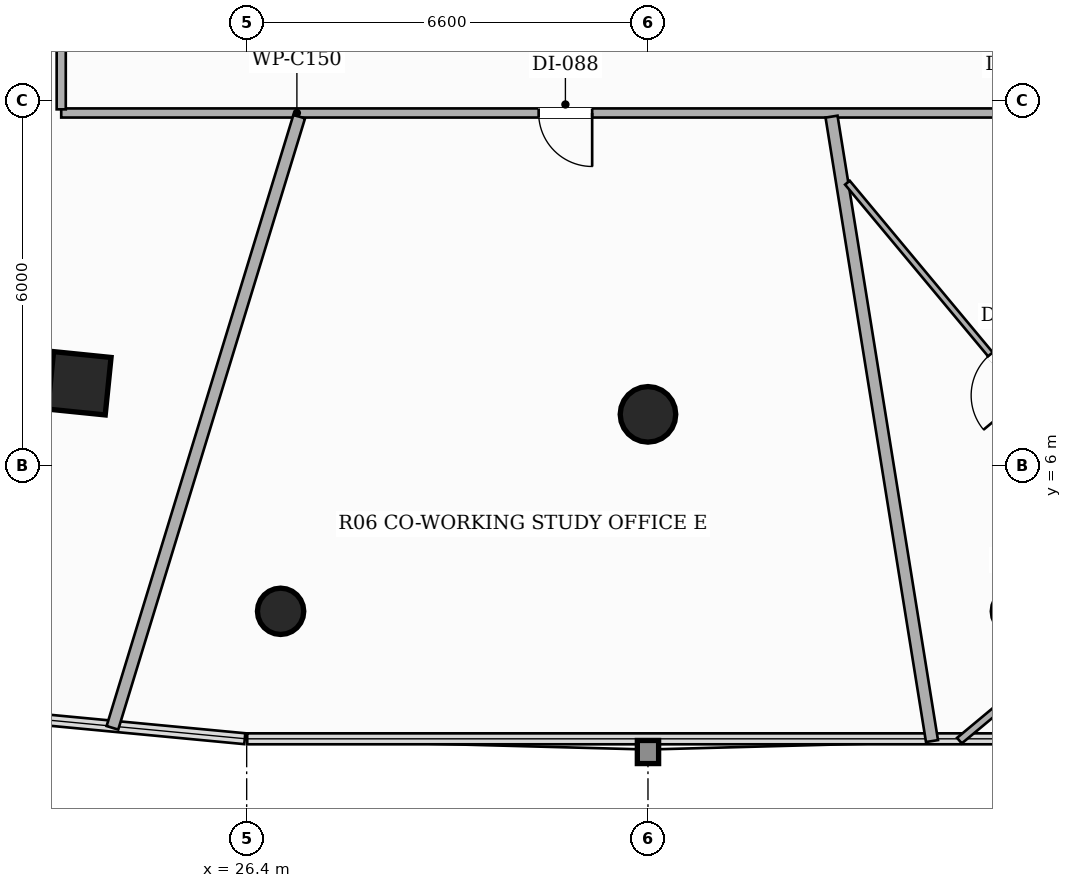
"""IFC4 building model, lengths in metres.
Left out: names, types, materials, properties, quantities, classifications, styles, units other than length and angle.
Written with IfcOpenShell. Run it as: python <this file> out.ifc"""

import sys

from ifc_helpers import new_model, si_unit, direction, frame, frame_2d, origin, origin_2d, place, context, subcontext, project, spatial, rectangle, hollow_rectangle, hollow_circle, extrude, element, fill, save


model = new_model("IFC4")
c1 = context("Model", 3, precision=1e-05, world=origin(), true_north=direction((0.0, 1.0)))
c2 = subcontext(c1, "Body", "Model", "MODEL_VIEW")
j1 = project(units=[si_unit("LENGTHUNIT", "METRE"), si_unit("PLANEANGLEUNIT", "RADIAN")], contexts=[c1])
p1 = place(None, origin())
s1 = spatial("IfcSite", under=j1, at=p1, CompositionType="ELEMENT")
p2 = place(p1, origin())
s2 = spatial("IfcBuilding", under=s1, at=p2, CompositionType="ELEMENT")
p3 = place(p2, frame((0.0, 0.0, 46.7)))
s3 = spatial("IfcBuildingStorey", under=s2, at=p3, CompositionType="ELEMENT", Elevation=46.7)
p4 = place(p3, frame((23.649, 7.355, 0.0), z_axis=(0.0, 0.0, 1.0), x_axis=(-0.994880708829, 0.101056297183, 0.0)))
e1 = element("IfcColumn", 1, at=p4, inside=s3, PredefinedType="COLUMN", context=c2, shape_type="SweptSolid", body=[
    extrude(hollow_rectangle(XDim=0.95, YDim=0.95, WallThickness=0.032, at=origin_2d()), origin(), (0.0, 0.0, 1.0), 3.3),
])
p5 = place(p3, frame((33.0, 6.844, 0.0), z_axis=(0.0, 0.0, 1.0), x_axis=(1.0, 0.0, 0.0)))
e2 = element("IfcColumn", 2, at=p5, inside=s3, PredefinedType="COLUMN", context=c2, shape_type="SweptSolid", body=[
    extrude(hollow_circle(Radius=0.457, WallThickness=0.025, at=origin_2d()), origin(), (0.0, 0.0, 1.0), 3.3),
])
for number, where, z_axis, x_axis in (
    (3, (26.958, 3.605, 0.0), (0.0, 0.0, 1.0), (1.0, 0.0, 0.0)),
    (4, (39.042, 3.605, 0.0), (0.0, 0.0, 1.0), (1.0, 0.0, 0.0)),
):
    element("IfcColumn", number, at=place(p3, frame(where, z_axis=z_axis, x_axis=x_axis)), inside=s3, PredefinedType="COLUMN", context=c2, shape_type="SweptSolid", body=[
        extrude(hollow_circle(Radius=0.381, WallThickness=0.022, at=origin_2d()), origin(), (0.0, 0.0, 1.0), 3.3),
    ])
p6 = place(p3, frame((42.59, 11.8, 0.0), z_axis=(0.0, 0.0, 1.0), x_axis=(-1.0, 0.0, 0.0)))
e5 = element("IfcWall", 5, at=p6, inside=s3, PredefinedType="PARTITIONING", context=c2, shape_type="SweptSolid", body=[
    extrude(rectangle(XDim=19.24, YDim=0.15, at=frame_2d((9.62, 0.0))), origin(), (0.0, 0.0, 1.0), 2.669),
])
p7 = place(p6, frame((10.508, 0.0, 0.0)))
e6 = element("IfcOpeningElement", 6, at=p7, cuts=e5, PredefinedType="OPENING", context=c2, shape_type="SweptSolid", body=[
    extrude(rectangle(XDim=0.88, YDim=2.1, at=frame_2d((0.44, 1.05))), frame((0.0, 0.085, 0.0), z_axis=(0.0, -1.0, 0.0), x_axis=(1.0, 0.0, 0.0)), (0.0, 0.0, 1.0), 0.17),
])
p8 = place(p6, frame((2.98, 0.0, 0.0)))
e7 = element("IfcOpeningElement", 7, at=p8, cuts=e5, PredefinedType="OPENING", context=c2, shape_type="SweptSolid", body=[
    extrude(rectangle(XDim=0.92, YDim=2.15, at=frame_2d((0.46, 1.075))), frame((0.0, 0.085, 0.0), z_axis=(0.0, -1.0, 0.0), x_axis=(1.0, 0.0, 0.0)), (0.0, 0.0, 1.0), 0.17),
])
p9 = place(p3, frame((23.35, 11.86, 0.0), z_axis=(0.0, 0.0, 1.0), x_axis=(0.0, 1.0, 0.0)))
e8 = element("IfcWall", 8, at=p9, inside=s3, PredefinedType="PARTITIONING", context=c2, shape_type="SweptSolid", body=[
    extrude(rectangle(XDim=25.04, YDim=0.15, at=frame_2d((12.52, 0.0))), origin(), (0.0, 0.0, 1.0), 2.413),
])
p10 = place(p9, frame((18.67, 0.0, 0.0)))
e9 = element("IfcOpeningElement", 9, at=p10, cuts=e8, PredefinedType="OPENING", context=c2, shape_type="SweptSolid", body=[
    extrude(rectangle(XDim=0.88, YDim=2.1, at=frame_2d((0.44, 1.05))), frame((0.0, 0.085, 0.0), z_axis=(0.0, -1.0, 0.0), x_axis=(1.0, 0.0, 0.0)), (0.0, 0.0, 1.0), 0.17),
])
p11 = place(p9, frame((3.543, 0.0, 0.0)))
e10 = element("IfcOpeningElement", 10, at=p11, cuts=e8, PredefinedType="OPENING", context=c2, shape_type="SweptSolid", body=[
    extrude(rectangle(XDim=0.88, YDim=2.1, at=frame_2d((0.44, 1.05))), frame((0.0, 0.085, 0.0), z_axis=(0.0, -1.0, 0.0), x_axis=(1.0, 0.0, 0.0)), (0.0, 0.0, 1.0), 0.17),
])
p12 = place(p9, frame((8.445, 0.0, 0.0)))
e11 = element("IfcOpeningElement", 11, at=p12, cuts=e8, PredefinedType="OPENING", context=c2, shape_type="SweptSolid", body=[
    extrude(rectangle(XDim=0.92, YDim=2.15, at=frame_2d((0.46, 1.075))), frame((0.0, 0.085, 0.0), z_axis=(0.0, -1.0, 0.0), x_axis=(1.0, 0.0, 0.0)), (0.0, 0.0, 1.0), 0.17),
])
p13 = place(p9, frame((11.535, 0.0, 0.0)))
e12 = element("IfcOpeningElement", 12, at=p13, cuts=e8, PredefinedType="OPENING", context=c2, shape_type="SweptSolid", body=[
    extrude(rectangle(XDim=0.92, YDim=2.15, at=frame_2d((0.46, 1.075))), frame((0.0, 0.085, 0.0), z_axis=(0.0, -1.0, 0.0), x_axis=(1.0, 0.0, 0.0)), (0.0, 0.0, 1.0), 0.17),
])
p14 = place(p3, frame((27.264, 11.74, 0.0), z_axis=(0.0, 0.0, 1.0), x_axis=(-0.292294665238, -0.956328305904, 0.0)))
e13 = element("IfcWall", 13, at=p14, inside=s3, PredefinedType="PARTITIONING", context=c2, shape_type="SweptSolid", body=[
    extrude(rectangle(XDim=10.51, YDim=0.2, at=frame_2d((5.255, 0.0))), origin(), (0.0, 0.0, 1.0), 2.413),
])
p15 = place(p3, frame((9.097, 3.318, 0.0), z_axis=(0.0, 0.0, 1.0), x_axis=(0.66036589704, 0.750943993935, 0.0)))
e14 = element("IfcWall", 14, at=p15, inside=s3, PredefinedType="PARTITIONING", context=c2, shape_type="SweptSolid", body=[
    extrude(rectangle(XDim=21.493, YDim=0.2, at=frame_2d((10.747, 0.0))), origin(), (0.0, 0.0, 1.0), 2.413),
])
p16 = place(p3, frame((36.019, 11.74, 0.0), z_axis=(0.0, 0.0, 1.0), x_axis=(0.158816201081, -0.98730816581, 0.0)))
e15 = element("IfcWall", 15, at=p16, inside=s3, PredefinedType="PARTITIONING", context=c2, shape_type="SweptSolid", body=[
    extrude(rectangle(XDim=10.401, YDim=0.2, at=frame_2d((5.201, 0.0))), origin(), (0.0, 0.0, 1.0), 2.413),
])
p17 = place(p3, frame((4.362, 6.486, 0.0), z_axis=(0.0, 0.0, 1.0), x_axis=(0.766256370513, 0.642534959865, 0.0)))
e16 = element("IfcWall", 16, at=p17, inside=s3, PredefinedType="PARTITIONING", context=c2, shape_type="SweptSolid", body=[
    extrude(rectangle(XDim=24.702, YDim=0.2, at=frame_2d((12.351, 0.0))), origin(), (0.0, 0.0, 1.0), 2.413),
])
p18 = place(p3, frame((41.547, 4.331, 0.0), z_axis=(0.0, 0.0, 1.0), x_axis=(-0.640035566376, 0.768345282913, 0.0)))
e17 = element("IfcWall", 17, at=p18, inside=s3, PredefinedType="PARTITIONING", context=c2, shape_type="SweptSolid", body=[
    extrude(rectangle(XDim=8.229, YDim=0.1, at=frame_2d((4.115, 0.0))), origin(), (0.0, 0.0, 1.0), 2.413),
])
p19 = place(p18, frame((3.675, 0.0, 0.0)))
e18 = element("IfcOpeningElement", 18, at=p19, cuts=e17, PredefinedType="OPENING", context=c2, shape_type="SweptSolid", body=[
    extrude(rectangle(XDim=0.88, YDim=2.1, at=frame_2d((0.44, 1.05))), frame((0.0, 0.06, 0.0), z_axis=(0.0, -1.0, 0.0), x_axis=(1.0, 0.0, 0.0)), (0.0, 0.0, 1.0), 0.12),
])
p20 = place(p3, frame((38.122, 1.478, 0.0), z_axis=(0.0, 0.0, 1.0), x_axis=(0.768351451836, 0.640028160678, 0.0)))
e19 = element("IfcWall", 19, at=p20, inside=s3, PredefinedType="PARTITIONING", context=c2, shape_type="SweptSolid", body=[
    extrude(rectangle(XDim=4.458, YDim=0.12, at=frame_2d((2.229, 0.0))), origin(), (0.0, 0.0, 1.0), 3.06),
])
p21 = place(p7, origin())
e20 = element("IfcDoor", 20, at=p21, inside=s3, OperationType="SINGLE_SWING_LEFT", PredefinedType="DOOR", context=c2, shape_type="SweptSolid", body=[
    extrude(rectangle(XDim=0.88, YDim=2.1, at=frame_2d((0.44, 1.05))), frame((0.0, 0.025, 0.0), z_axis=(0.0, -1.0, 0.0), x_axis=(1.0, 0.0, 0.0)), (0.0, 0.0, 1.0), 0.05),
])
fill(e6, e20)
p22 = place(p19, origin())
e21 = element("IfcDoor", 21, at=p22, inside=s3, OperationType="SINGLE_SWING_LEFT", PredefinedType="DOOR", context=c2, shape_type="SweptSolid", body=[
    extrude(rectangle(XDim=0.88, YDim=2.1, at=frame_2d((0.44, 1.05))), frame((0.0, 0.025, 0.0), z_axis=(0.0, -1.0, 0.0), x_axis=(1.0, 0.0, 0.0)), (0.0, 0.0, 1.0), 0.05),
])
fill(e18, e21)
save(model, sys.argv[1])
